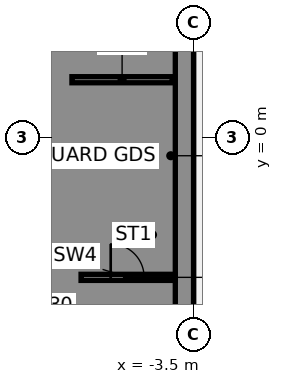
"""IFC4 building model, lengths in metres.
Left out: names, types, materials, properties, quantities, classifications, styles, units other than length and angle.
Written with IfcOpenShell. Run it as: python <this file> out.ifc"""

import sys

from ifc_helpers import new_model, si_unit, direction, frame, frame_2d, origin, place, context, subcontext, project, spatial, polyline, rectangle, outline, extrude, element, fill, save


model = new_model("IFC4")
c1 = context("Model", 3, precision=1e-05, world=origin(), true_north=direction((0.0, 1.0)))
c2 = subcontext(c1, "Body", "Model", "MODEL_VIEW")
j1 = project(units=[si_unit("LENGTHUNIT", "METRE"), si_unit("PLANEANGLEUNIT", "RADIAN")], contexts=[c1])
p1 = place(None, origin())
s1 = spatial("IfcSite", under=j1, at=p1, CompositionType="ELEMENT")
p2 = place(p1, origin())
s2 = spatial("IfcBuilding", under=s1, at=p2, CompositionType="ELEMENT")
p3 = place(p2, frame((0.0, 0.0, 124.75)))
s3 = spatial("IfcBuildingStorey", under=s2, at=p3, CompositionType="ELEMENT", Elevation=124.75)
p4 = place(p3, origin())
e1 = element("IfcWall", 1, at=p4, inside=s3, PredefinedType="SHEAR", context=c2, shape_type="SweptSolid", body=[
    extrude(outline(polyline([(-9.8, -5.375), (-9.8, -5.625), (-7.5, -5.625), (-7.2, -5.625), (-7.2, 8.9), (-7.5, 8.9), (-9.8, 8.9), (-9.8, 8.125), (-7.5, 8.125), (-7.5, 5.625), (-9.8, 5.625), (-9.8, 5.375), (-7.5, 5.375), (-7.5, 2.875), (-9.8, 2.875), (-9.8, 2.625), (-7.5, 2.625), (-7.5, 0.125), (-9.8, 0.125), (-9.8, -0.125), (-7.5, -0.125), (-7.5, -2.625), (-9.8, -2.625), (-9.8, -2.875), (-7.5, -2.875), (-7.5, -5.375), (-9.8, -5.375)])), origin(), (0.0, 0.0, 1.0), 3.57),
])
p5 = place(p3, frame((-7.5, 1.9, 0.0), z_axis=(0.0, 0.0, 1.0), x_axis=(1.0, 0.0, 0.0)))
e2 = element("IfcWall", 2, at=p5, inside=s3, PredefinedType="SHEAR", context=c2, shape_type="SweptSolid", body=[
    extrude(rectangle(XDim=3.3, YDim=0.2, at=frame_2d((1.65, 0.0))), origin(), (0.0, 0.0, 1.0), 3.57),
])
p6 = place(p3, frame((-3.8, -8.9, 0.0), z_axis=(0.0, 0.0, 1.0), x_axis=(0.0, 1.0, 0.0)))
e3 = element("IfcWall", 3, at=p6, inside=s3, PredefinedType="SHEAR", context=c2, shape_type="SweptSolid", body=[
    extrude(rectangle(XDim=17.8, YDim=0.6, at=frame_2d((8.9, 0.0))), origin(), (0.0, 0.0, 1.0), 3.57),
])
p7 = place(p6, frame((1.25, 0.0, 0.0)))
e4 = element("IfcOpeningElement", 4, at=p7, cuts=e3, PredefinedType="OPENING", context=c2, shape_type="SweptSolid", body=[
    extrude(rectangle(XDim=1.8, YDim=2.1, at=frame_2d((0.9, 1.05))), frame((0.0, 0.31, 0.0), z_axis=(0.0, -1.0, 0.0), x_axis=(1.0, 0.0, 0.0)), (0.0, 0.0, 1.0), 0.62),
])
p8 = place(p6, frame((12.377, 0.0, 0.0)))
e5 = element("IfcOpeningElement", 5, at=p8, cuts=e3, PredefinedType="OPENING", context=c2, shape_type="SweptSolid", body=[
    extrude(rectangle(XDim=1.0, YDim=2.1, at=frame_2d((0.5, 1.05))), frame((0.0, 0.31, 0.0), z_axis=(0.0, -1.0, 0.0), x_axis=(1.0, 0.0, 0.0)), (0.0, 0.0, 1.0), 0.62),
])
p9 = place(p6, frame((15.903, 0.0, 0.0)))
e6 = element("IfcOpeningElement", 6, at=p9, cuts=e3, PredefinedType="OPENING", context=c2, shape_type="SweptSolid", body=[
    extrude(rectangle(XDim=1.0, YDim=2.1, at=frame_2d((0.5, 1.05))), frame((0.0, 0.31, 0.0), z_axis=(0.0, -1.0, 0.0), x_axis=(1.0, 0.0, 0.0)), (0.0, 0.0, 1.0), 0.62),
])
p10 = place(p3, frame((-7.2, -4.6, 0.0), z_axis=(0.0, 0.0, 1.0), x_axis=(1.0, 0.0, 0.0)))
e7 = element("IfcWall", 7, at=p10, inside=s3, PredefinedType="SHEAR", context=c2, shape_type="SweptSolid", body=[
    extrude(rectangle(XDim=3.1, YDim=0.2, at=frame_2d((1.55, 0.0))), origin(), (0.0, 0.0, 1.0), 3.57),
])
p11 = place(p10, frame((0.975, 0.0, 0.0)))
e8 = element("IfcOpeningElement", 8, at=p11, cuts=e7, PredefinedType="OPENING", context=c2, shape_type="SweptSolid", body=[
    extrude(rectangle(XDim=1.1, YDim=2.1, at=frame_2d((0.55, 1.05))), frame((0.0, 0.11, 0.0), z_axis=(0.0, -1.0, 0.0), x_axis=(1.0, 0.0, 0.0)), (0.0, 0.0, 1.0), 0.22),
])
p12 = place(p11, origin())
e9 = element("IfcDoor", 9, at=p12, inside=s3, OperationType="SINGLE_SWING_LEFT", PredefinedType="DOOR", context=c2, shape_type="SweptSolid", body=[
    extrude(rectangle(XDim=1.1, YDim=2.1, at=frame_2d((0.55, 1.05))), frame((0.0, 0.025, 0.0), z_axis=(0.0, -1.0, 0.0), x_axis=(1.0, 0.0, 0.0)), (0.0, 0.0, 1.0), 0.05),
])
fill(e8, e9)
save(model, sys.argv[1])
